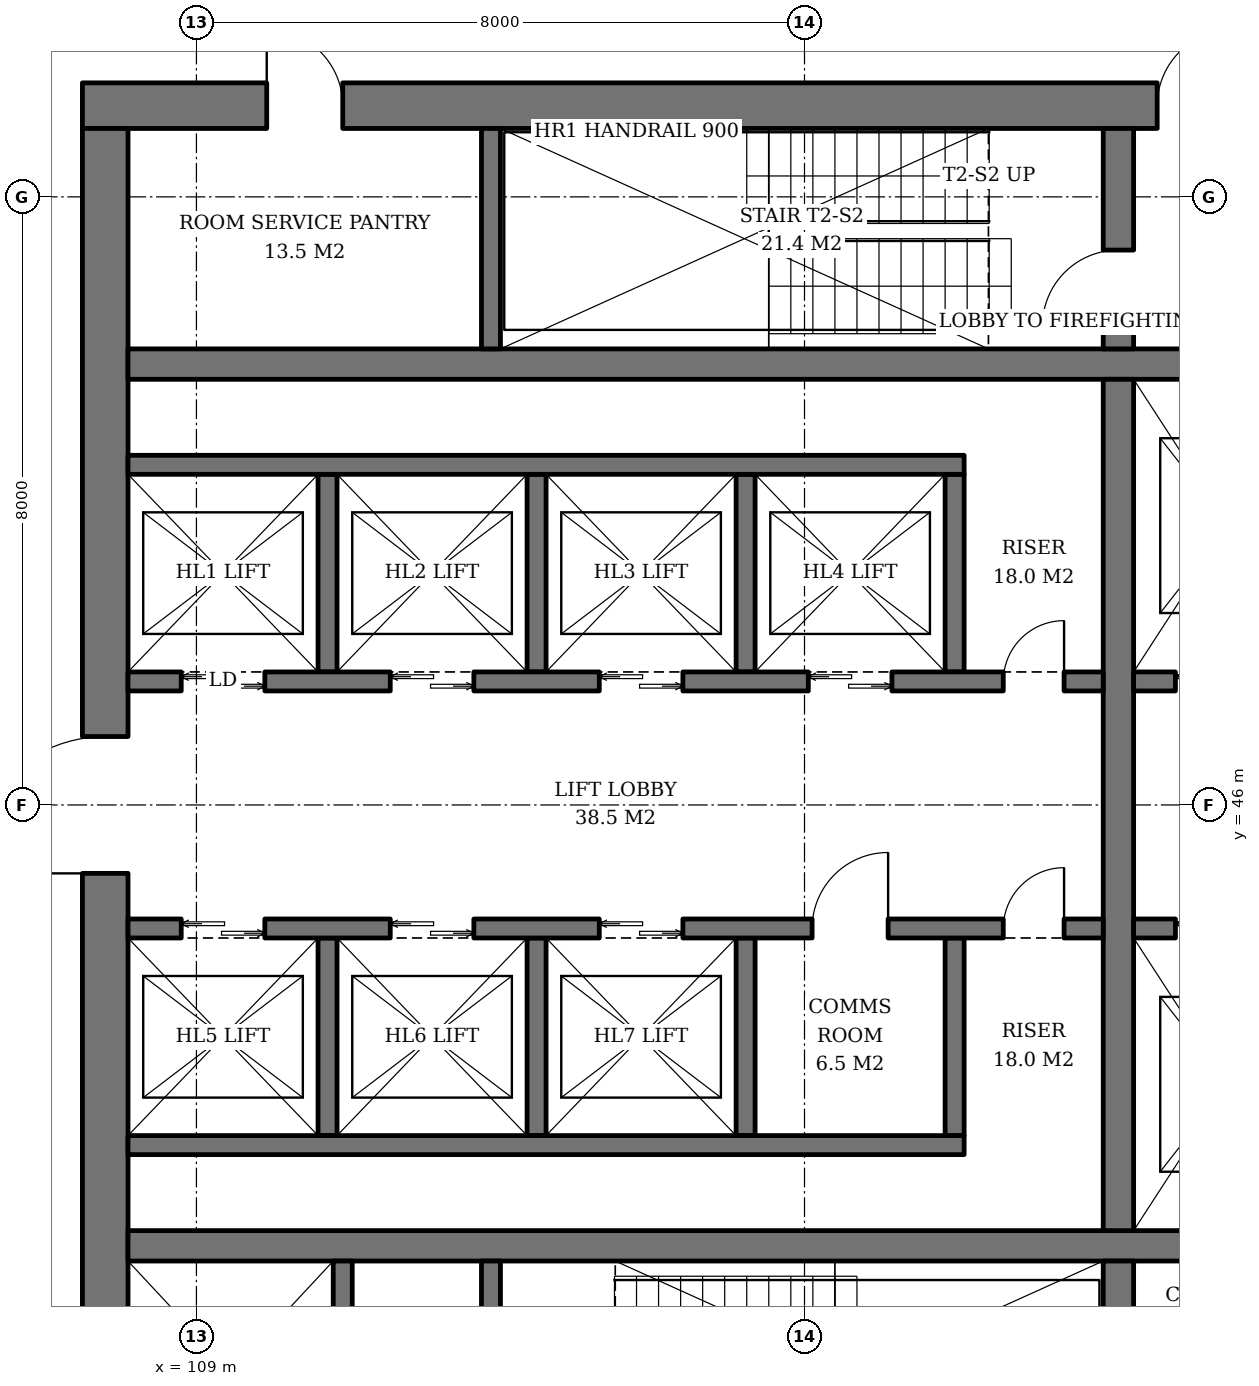
"""IFC4 building model, lengths in metres.
Left out: names, types, materials, properties, quantities, classifications, styles, units other than length and angle.
Written with IfcOpenShell. Run it as: python <this file> out.ifc"""

import sys

from ifc_helpers import new_model, si_unit, direction, frame, frame_2d, origin, place, context, subcontext, project, spatial, rectangle, extrude, element, fill, save


model = new_model("IFC4")
c1 = context("Model", 3, precision=1e-05, world=origin(), true_north=direction((0.0, 1.0)))
c2 = subcontext(c1, "Body", "Model", "MODEL_VIEW")
j1 = project(units=[si_unit("LENGTHUNIT", "METRE"), si_unit("PLANEANGLEUNIT", "RADIAN")], contexts=[c1])
p1 = place(None, origin())
s1 = spatial("IfcSite", under=j1, at=p1, CompositionType="ELEMENT")
p2 = place(p1, origin())
s2 = spatial("IfcBuilding", under=s1, at=p2, CompositionType="ELEMENT")
p3 = place(p2, frame((0.0, 0.0, 51.4)))
s3 = spatial("IfcBuildingStorey", under=s2, at=p3, CompositionType="ELEMENT", Elevation=51.4)
p4 = place(p3, frame((107.5, 55.2, 0.0), z_axis=(0.0, 0.0, 1.0), x_axis=(1.0, 0.0, 0.0)))
e1 = element("IfcWall", 1, at=p4, inside=s3, PredefinedType="SHEAR", context=c2, shape_type="SweptSolid", body=[
    extrude(rectangle(XDim=19.0, YDim=0.6, at=frame_2d((9.5, 0.0))), origin(), (0.0, 0.0, 1.0), 3.8),
])
p5 = place(p4, frame((14.14, 0.0, 0.0)))
e2 = element("IfcOpeningElement", 2, at=p5, cuts=e1, PredefinedType="OPENING", context=c2, shape_type="SweptSolid", body=[
    extrude(rectangle(XDim=1.0, YDim=2.1, at=frame_2d((0.5, 1.05))), frame((0.0, 0.31, 0.0), z_axis=(0.0, -1.0, 0.0), x_axis=(1.0, 0.0, 0.0)), (0.0, 0.0, 1.0), 0.62),
])
p6 = place(p4, frame((2.425, 0.0, 0.0)))
e3 = element("IfcOpeningElement", 3, at=p6, cuts=e1, PredefinedType="OPENING", context=c2, shape_type="SweptSolid", body=[
    extrude(rectangle(XDim=1.0, YDim=2.1, at=frame_2d((0.5, 1.05))), frame((0.0, 0.31, 0.0), z_axis=(0.0, -1.0, 0.0), x_axis=(1.0, 0.0, 0.0)), (0.0, 0.0, 1.0), 0.62),
])
p7 = place(p3, frame((107.8, 37.1, 0.0), z_axis=(0.0, 0.0, 1.0), x_axis=(0.0, 1.0, 0.0)))
e4 = element("IfcWall", 4, at=p7, inside=s3, PredefinedType="SHEAR", context=c2, shape_type="SweptSolid", body=[
    extrude(rectangle(XDim=17.8, YDim=0.6, at=frame_2d((8.9, 0.0))), origin(), (0.0, 0.0, 1.0), 3.8),
])
p8 = place(p7, frame((8.0, 0.0, 0.0)))
e5 = element("IfcOpeningElement", 5, at=p8, cuts=e4, PredefinedType="OPENING", context=c2, shape_type="SweptSolid", body=[
    extrude(rectangle(XDim=1.8, YDim=2.4, at=frame_2d((0.9, 1.2))), frame((0.0, 0.31, 0.0), z_axis=(0.0, -1.0, 0.0), x_axis=(1.0, 0.0, 0.0)), (0.0, 0.0, 1.0), 0.62),
])
for number, where, z_axis, x_axis in (
    (6, (108.1, 40.2, 0.0), (0.0, 0.0, 1.0), (1.0, 0.0, 0.0)),
    (7, (108.1, 51.8, 0.0), (0.0, 0.0, 1.0), (1.0, 0.0, 0.0)),
):
    element("IfcWall", number, at=place(p3, frame(where, z_axis=z_axis, x_axis=x_axis)), inside=s3, PredefinedType="SHEAR", context=c2, shape_type="SweptSolid", body=[
        extrude(rectangle(XDim=17.8, YDim=0.4, at=frame_2d((8.9, 0.0))), origin(), (0.0, 0.0, 1.0), 3.8),
    ])
p9 = place(p3, frame((121.13, 37.1, 0.0), z_axis=(0.0, 0.0, 1.0), x_axis=(0.0, 1.0, 0.0)))
e8 = element("IfcWall", 8, at=p9, inside=s3, PredefinedType="SHEAR", context=c2, shape_type="SweptSolid", body=[
    extrude(rectangle(XDim=2.9, YDim=0.4, at=frame_2d((1.45, 0.0))), origin(), (0.0, 0.0, 1.0), 3.8),
])
p10 = place(p3, frame((121.13, 40.4, 0.0), z_axis=(0.0, 0.0, 1.0), x_axis=(0.0, 1.0, 0.0)))
e9 = element("IfcWall", 9, at=p10, inside=s3, PredefinedType="SHEAR", context=c2, shape_type="SweptSolid", body=[
    extrude(rectangle(XDim=11.2, YDim=0.4, at=frame_2d((5.6, 0.0))), origin(), (0.0, 0.0, 1.0), 3.8),
])
p11 = place(p3, frame((121.13, 52.0, 0.0), z_axis=(0.0, 0.0, 1.0), x_axis=(0.0, 1.0, 0.0)))
e10 = element("IfcWall", 10, at=p11, inside=s3, PredefinedType="SHEAR", context=c2, shape_type="SweptSolid", body=[
    extrude(rectangle(XDim=2.9, YDim=0.4, at=frame_2d((1.45, 0.0))), origin(), (0.0, 0.0, 1.0), 3.8),
])
p12 = place(p11, frame((0.3, 0.0, 0.0)))
e11 = element("IfcOpeningElement", 11, at=p12, cuts=e10, PredefinedType="OPENING", context=c2, shape_type="SweptSolid", body=[
    extrude(rectangle(XDim=1.0, YDim=2.1, at=frame_2d((0.5, 1.05))), frame((0.0, 0.21, 0.0), z_axis=(0.0, -1.0, 0.0), x_axis=(1.0, 0.0, 0.0)), (0.0, 0.0, 1.0), 0.42),
])
p13 = place(p3, frame((110.925, 37.1, 0.0), z_axis=(0.0, 0.0, 1.0), x_axis=(0.0, 1.0, 0.0)))
e12 = element("IfcWall", 12, at=p13, inside=s3, PredefinedType="SHEAR", context=c2, shape_type="SweptSolid", body=[
    extrude(rectangle(XDim=2.9, YDim=0.25, at=frame_2d((1.45, 0.0))), origin(), (0.0, 0.0, 1.0), 3.8),
])
p14 = place(p13, frame((0.8, 0.0, 0.0)))
e13 = element("IfcOpeningElement", 13, at=p14, cuts=e12, PredefinedType="OPENING", context=c2, shape_type="SweptSolid", body=[
    extrude(rectangle(XDim=1.3, YDim=2.2, at=frame_2d((0.65, 1.1))), frame((0.0, 0.135, 0.0), z_axis=(0.0, -1.0, 0.0), x_axis=(1.0, 0.0, 0.0)), (0.0, 0.0, 1.0), 0.27),
])
p15 = place(p3, frame((112.875, 37.1, 0.0), z_axis=(0.0, 0.0, 1.0), x_axis=(0.0, 1.0, 0.0)))
e14 = element("IfcWall", 14, at=p15, inside=s3, PredefinedType="SHEAR", context=c2, shape_type="SweptSolid", body=[
    extrude(rectangle(XDim=2.9, YDim=0.25, at=frame_2d((1.45, 0.0))), origin(), (0.0, 0.0, 1.0), 3.8),
])
p16 = place(p15, frame((0.75, 0.0, 0.0)))
e15 = element("IfcOpeningElement", 15, at=p16, cuts=e14, PredefinedType="OPENING", context=c2, shape_type="SweptSolid", body=[
    extrude(rectangle(XDim=1.2, YDim=2.1, at=frame_2d((0.6, 1.05))), frame((0.0, 0.135, 0.0), z_axis=(0.0, -1.0, 0.0), x_axis=(1.0, 0.0, 0.0)), (0.0, 0.0, 1.0), 0.27),
])
p17 = place(p3, frame((112.875, 52.0, 0.0), z_axis=(0.0, 0.0, 1.0), x_axis=(0.0, 1.0, 0.0)))
e16 = element("IfcWall", 16, at=p17, inside=s3, PredefinedType="SHEAR", context=c2, shape_type="SweptSolid", body=[
    extrude(rectangle(XDim=2.9, YDim=0.25, at=frame_2d((1.45, 0.0))), origin(), (0.0, 0.0, 1.0), 3.8),
])
for number, where, z_axis, x_axis in (
    (17, (110.725, 47.75, 0.0), (0.0, 0.0, 1.0), (0.0, 1.0, 0.0)),
    (18, (113.475, 47.75, 0.0), (0.0, 0.0, 1.0), (0.0, 1.0, 0.0)),
    (19, (116.225, 47.75, 0.0), (0.0, 0.0, 1.0), (0.0, 1.0, 0.0)),
    (20, (118.975, 47.75, 0.0), (0.0, 0.0, 1.0), (0.0, 1.0, 0.0)),
):
    element("IfcWall", number, at=place(p3, frame(where, z_axis=z_axis, x_axis=x_axis)), inside=s3, PredefinedType="SHEAR", context=c2, shape_type="SweptSolid", body=[
        extrude(rectangle(XDim=2.6, YDim=0.25, at=frame_2d((1.3, 0.0))), origin(), (0.0, 0.0, 1.0), 3.8),
    ])
p18 = place(p3, frame((108.1, 50.475, 0.0), z_axis=(0.0, 0.0, 1.0), x_axis=(1.0, 0.0, 0.0)))
e21 = element("IfcWall", 21, at=p18, inside=s3, PredefinedType="SHEAR", context=c2, shape_type="SweptSolid", body=[
    extrude(rectangle(XDim=11.0, YDim=0.25, at=frame_2d((5.5, 0.0))), origin(), (0.0, 0.0, 1.0), 3.8),
])
p19 = place(p3, frame((108.1, 47.625, 0.0), z_axis=(0.0, 0.0, 1.0), x_axis=(1.0, 0.0, 0.0)))
e22 = element("IfcWall", 22, at=p19, inside=s3, PredefinedType="SHEAR", context=c2, shape_type="SweptSolid", body=[
    extrude(rectangle(XDim=12.83, YDim=0.25, at=frame_2d((6.415, 0.0))), origin(), (0.0, 0.0, 1.0), 3.8),
])
p20 = place(p19, frame((0.7, 0.0, 0.0)))
e23 = element("IfcOpeningElement", 23, at=p20, cuts=e22, PredefinedType="OPENING", context=c2, shape_type="SweptSolid", body=[
    extrude(rectangle(XDim=1.1, YDim=2.2, at=frame_2d((0.55, 1.1))), frame((0.0, 0.135, 0.0), z_axis=(0.0, -1.0, 0.0), x_axis=(1.0, 0.0, 0.0)), (0.0, 0.0, 1.0), 0.27),
])
p21 = place(p19, frame((3.45, 0.0, 0.0)))
e24 = element("IfcOpeningElement", 24, at=p21, cuts=e22, PredefinedType="OPENING", context=c2, shape_type="SweptSolid", body=[
    extrude(rectangle(XDim=1.1, YDim=2.2, at=frame_2d((0.55, 1.1))), frame((0.0, 0.135, 0.0), z_axis=(0.0, -1.0, 0.0), x_axis=(1.0, 0.0, 0.0)), (0.0, 0.0, 1.0), 0.27),
])
p22 = place(p19, frame((6.2, 0.0, 0.0)))
e25 = element("IfcOpeningElement", 25, at=p22, cuts=e22, PredefinedType="OPENING", context=c2, shape_type="SweptSolid", body=[
    extrude(rectangle(XDim=1.1, YDim=2.2, at=frame_2d((0.55, 1.1))), frame((0.0, 0.135, 0.0), z_axis=(0.0, -1.0, 0.0), x_axis=(1.0, 0.0, 0.0)), (0.0, 0.0, 1.0), 0.27),
])
p23 = place(p19, frame((8.95, 0.0, 0.0)))
e26 = element("IfcOpeningElement", 26, at=p23, cuts=e22, PredefinedType="OPENING", context=c2, shape_type="SweptSolid", body=[
    extrude(rectangle(XDim=1.1, YDim=2.2, at=frame_2d((0.55, 1.1))), frame((0.0, 0.135, 0.0), z_axis=(0.0, -1.0, 0.0), x_axis=(1.0, 0.0, 0.0)), (0.0, 0.0, 1.0), 0.27),
])
p24 = place(p19, frame((11.515, 0.0, 0.0)))
e27 = element("IfcOpeningElement", 27, at=p24, cuts=e22, PredefinedType="OPENING", context=c2, shape_type="SweptSolid", body=[
    extrude(rectangle(XDim=0.8, YDim=2.0, at=frame_2d((0.4, 1.0))), frame((0.0, 0.135, 0.0), z_axis=(0.0, -1.0, 0.0), x_axis=(1.0, 0.0, 0.0)), (0.0, 0.0, 1.0), 0.27),
])
for number, where, z_axis, x_axis in (
    (28, (110.725, 44.25, 0.0), (0.0, 0.0, 1.0), (0.0, -1.0, 0.0)),
    (29, (113.475, 44.25, 0.0), (0.0, 0.0, 1.0), (0.0, -1.0, 0.0)),
    (30, (116.225, 44.25, 0.0), (0.0, 0.0, 1.0), (0.0, -1.0, 0.0)),
    (31, (118.975, 44.25, 0.0), (0.0, 0.0, 1.0), (0.0, -1.0, 0.0)),
):
    element("IfcWall", number, at=place(p3, frame(where, z_axis=z_axis, x_axis=x_axis)), inside=s3, PredefinedType="SHEAR", context=c2, shape_type="SweptSolid", body=[
        extrude(rectangle(XDim=2.6, YDim=0.25, at=frame_2d((1.3, 0.0))), origin(), (0.0, 0.0, 1.0), 3.8),
    ])
p25 = place(p3, frame((108.1, 41.525, 0.0), z_axis=(0.0, 0.0, 1.0), x_axis=(1.0, 0.0, 0.0)))
e32 = element("IfcWall", 32, at=p25, inside=s3, PredefinedType="SHEAR", context=c2, shape_type="SweptSolid", body=[
    extrude(rectangle(XDim=11.0, YDim=0.25, at=frame_2d((5.5, 0.0))), origin(), (0.0, 0.0, 1.0), 3.8),
])
p26 = place(p3, frame((108.1, 44.375, 0.0), z_axis=(0.0, 0.0, 1.0), x_axis=(1.0, 0.0, 0.0)))
e33 = element("IfcWall", 33, at=p26, inside=s3, PredefinedType="SHEAR", context=c2, shape_type="SweptSolid", body=[
    extrude(rectangle(XDim=12.83, YDim=0.25, at=frame_2d((6.415, 0.0))), origin(), (0.0, 0.0, 1.0), 3.8),
])
p27 = place(p26, frame((0.7, 0.0, 0.0)))
e34 = element("IfcOpeningElement", 34, at=p27, cuts=e33, PredefinedType="OPENING", context=c2, shape_type="SweptSolid", body=[
    extrude(rectangle(XDim=1.1, YDim=2.2, at=frame_2d((0.55, 1.1))), frame((0.0, 0.135, 0.0), z_axis=(0.0, -1.0, 0.0), x_axis=(1.0, 0.0, 0.0)), (0.0, 0.0, 1.0), 0.27),
])
p28 = place(p26, frame((3.45, 0.0, 0.0)))
e35 = element("IfcOpeningElement", 35, at=p28, cuts=e33, PredefinedType="OPENING", context=c2, shape_type="SweptSolid", body=[
    extrude(rectangle(XDim=1.1, YDim=2.2, at=frame_2d((0.55, 1.1))), frame((0.0, 0.135, 0.0), z_axis=(0.0, -1.0, 0.0), x_axis=(1.0, 0.0, 0.0)), (0.0, 0.0, 1.0), 0.27),
])
p29 = place(p26, frame((6.2, 0.0, 0.0)))
e36 = element("IfcOpeningElement", 36, at=p29, cuts=e33, PredefinedType="OPENING", context=c2, shape_type="SweptSolid", body=[
    extrude(rectangle(XDim=1.1, YDim=2.2, at=frame_2d((0.55, 1.1))), frame((0.0, 0.135, 0.0), z_axis=(0.0, -1.0, 0.0), x_axis=(1.0, 0.0, 0.0)), (0.0, 0.0, 1.0), 0.27),
])
p30 = place(p26, frame((9.0, 0.0, 0.0)))
e37 = element("IfcOpeningElement", 37, at=p30, cuts=e33, PredefinedType="OPENING", context=c2, shape_type="SweptSolid", body=[
    extrude(rectangle(XDim=1.0, YDim=2.1, at=frame_2d((0.5, 1.05))), frame((0.0, 0.135, 0.0), z_axis=(0.0, -1.0, 0.0), x_axis=(1.0, 0.0, 0.0)), (0.0, 0.0, 1.0), 0.27),
])
p31 = place(p26, frame((11.515, 0.0, 0.0)))
e38 = element("IfcOpeningElement", 38, at=p31, cuts=e33, PredefinedType="OPENING", context=c2, shape_type="SweptSolid", body=[
    extrude(rectangle(XDim=0.8, YDim=2.0, at=frame_2d((0.4, 1.0))), frame((0.0, 0.135, 0.0), z_axis=(0.0, -1.0, 0.0), x_axis=(1.0, 0.0, 0.0)), (0.0, 0.0, 1.0), 0.27),
])
p32 = place(p3, frame((121.33, 47.625, 0.0), z_axis=(0.0, 0.0, 1.0), x_axis=(1.0, 0.0, 0.0)))
e39 = element("IfcWall", 39, at=p32, inside=s3, PredefinedType="SHEAR", context=c2, shape_type="SweptSolid", body=[
    extrude(rectangle(XDim=4.57, YDim=0.25, at=frame_2d((2.285, 0.0))), origin(), (0.0, 0.0, 1.0), 3.8),
])
p33 = place(p32, frame((0.55, 0.0, 0.0)))
e40 = element("IfcOpeningElement", 40, at=p33, cuts=e39, PredefinedType="OPENING", context=c2, shape_type="SweptSolid", body=[
    extrude(rectangle(XDim=1.4, YDim=2.4, at=frame_2d((0.7, 1.2))), frame((0.0, 0.135, 0.0), z_axis=(0.0, -1.0, 0.0), x_axis=(1.0, 0.0, 0.0)), (0.0, 0.0, 1.0), 0.27),
])
p34 = place(p32, frame((3.26, 0.0, 0.0)))
e41 = element("IfcOpeningElement", 41, at=p34, cuts=e39, PredefinedType="OPENING", context=c2, shape_type="SweptSolid", body=[
    extrude(rectangle(XDim=0.8, YDim=2.0, at=frame_2d((0.4, 1.0))), frame((0.0, 0.135, 0.0), z_axis=(0.0, -1.0, 0.0), x_axis=(1.0, 0.0, 0.0)), (0.0, 0.0, 1.0), 0.27),
])
p35 = place(p3, frame((121.33, 44.375, 0.0), z_axis=(0.0, 0.0, 1.0), x_axis=(1.0, 0.0, 0.0)))
e42 = element("IfcWall", 42, at=p35, inside=s3, PredefinedType="SHEAR", context=c2, shape_type="SweptSolid", body=[
    extrude(rectangle(XDim=4.57, YDim=0.25, at=frame_2d((2.285, 0.0))), origin(), (0.0, 0.0, 1.0), 3.8),
])
p36 = place(p35, frame((0.55, 0.0, 0.0)))
e43 = element("IfcOpeningElement", 43, at=p36, cuts=e42, PredefinedType="OPENING", context=c2, shape_type="SweptSolid", body=[
    extrude(rectangle(XDim=1.4, YDim=2.4, at=frame_2d((0.7, 1.2))), frame((0.0, 0.135, 0.0), z_axis=(0.0, -1.0, 0.0), x_axis=(1.0, 0.0, 0.0)), (0.0, 0.0, 1.0), 0.27),
])
p37 = place(p35, frame((3.26, 0.0, 0.0)))
e44 = element("IfcOpeningElement", 44, at=p37, cuts=e42, PredefinedType="OPENING", context=c2, shape_type="SweptSolid", body=[
    extrude(rectangle(XDim=0.8, YDim=2.0, at=frame_2d((0.4, 1.0))), frame((0.0, 0.135, 0.0), z_axis=(0.0, -1.0, 0.0), x_axis=(1.0, 0.0, 0.0)), (0.0, 0.0, 1.0), 0.27),
])
p38 = place(p20, origin())
e45 = element("IfcDoor", 45, at=p38, inside=s3, OperationType="DOUBLE_DOOR_SLIDING", PredefinedType="DOOR", context=c2, shape_type="SweptSolid", body=[
    extrude(rectangle(XDim=1.1, YDim=2.2, at=frame_2d((0.55, 1.1))), frame((0.0, 0.025, 0.0), z_axis=(0.0, -1.0, 0.0), x_axis=(1.0, 0.0, 0.0)), (0.0, 0.0, 1.0), 0.05),
])
fill(e23, e45)
p39 = place(p21, origin())
e46 = element("IfcDoor", 46, at=p39, inside=s3, OperationType="DOUBLE_DOOR_SLIDING", PredefinedType="DOOR", context=c2, shape_type="SweptSolid", body=[
    extrude(rectangle(XDim=1.1, YDim=2.2, at=frame_2d((0.55, 1.1))), frame((0.0, 0.025, 0.0), z_axis=(0.0, -1.0, 0.0), x_axis=(1.0, 0.0, 0.0)), (0.0, 0.0, 1.0), 0.05),
])
fill(e24, e46)
p40 = place(p22, origin())
e47 = element("IfcDoor", 47, at=p40, inside=s3, OperationType="DOUBLE_DOOR_SLIDING", PredefinedType="DOOR", context=c2, shape_type="SweptSolid", body=[
    extrude(rectangle(XDim=1.1, YDim=2.2, at=frame_2d((0.55, 1.1))), frame((0.0, 0.025, 0.0), z_axis=(0.0, -1.0, 0.0), x_axis=(1.0, 0.0, 0.0)), (0.0, 0.0, 1.0), 0.05),
])
fill(e25, e47)
p41 = place(p23, origin())
e48 = element("IfcDoor", 48, at=p41, inside=s3, OperationType="DOUBLE_DOOR_SLIDING", PredefinedType="DOOR", context=c2, shape_type="SweptSolid", body=[
    extrude(rectangle(XDim=1.1, YDim=2.2, at=frame_2d((0.55, 1.1))), frame((0.0, 0.025, 0.0), z_axis=(0.0, -1.0, 0.0), x_axis=(1.0, 0.0, 0.0)), (0.0, 0.0, 1.0), 0.05),
])
fill(e26, e48)
p42 = place(p24, origin())
e49 = element("IfcDoor", 49, at=p42, inside=s3, OperationType="SINGLE_SWING_RIGHT", PredefinedType="DOOR", context=c2, shape_type="SweptSolid", body=[
    extrude(rectangle(XDim=0.8, YDim=2.0, at=frame_2d((0.4, 1.0))), frame((0.0, 0.025, 0.0), z_axis=(0.0, -1.0, 0.0), x_axis=(1.0, 0.0, 0.0)), (0.0, 0.0, 1.0), 0.05),
])
fill(e27, e49)
p43 = place(p27, origin())
e50 = element("IfcDoor", 50, at=p43, inside=s3, OperationType="DOUBLE_DOOR_SLIDING", PredefinedType="DOOR", context=c2, shape_type="SweptSolid", body=[
    extrude(rectangle(XDim=1.1, YDim=2.2, at=frame_2d((0.55, 1.1))), frame((0.0, 0.025, 0.0), z_axis=(0.0, -1.0, 0.0), x_axis=(1.0, 0.0, 0.0)), (0.0, 0.0, 1.0), 0.05),
])
fill(e34, e50)
p44 = place(p28, origin())
e51 = element("IfcDoor", 51, at=p44, inside=s3, OperationType="DOUBLE_DOOR_SLIDING", PredefinedType="DOOR", context=c2, shape_type="SweptSolid", body=[
    extrude(rectangle(XDim=1.1, YDim=2.2, at=frame_2d((0.55, 1.1))), frame((0.0, 0.025, 0.0), z_axis=(0.0, -1.0, 0.0), x_axis=(1.0, 0.0, 0.0)), (0.0, 0.0, 1.0), 0.05),
])
fill(e35, e51)
p45 = place(p29, origin())
e52 = element("IfcDoor", 52, at=p45, inside=s3, OperationType="DOUBLE_DOOR_SLIDING", PredefinedType="DOOR", context=c2, shape_type="SweptSolid", body=[
    extrude(rectangle(XDim=1.1, YDim=2.2, at=frame_2d((0.55, 1.1))), frame((0.0, 0.025, 0.0), z_axis=(0.0, -1.0, 0.0), x_axis=(1.0, 0.0, 0.0)), (0.0, 0.0, 1.0), 0.05),
])
fill(e36, e52)
p46 = place(p30, origin())
e53 = element("IfcDoor", 53, at=p46, inside=s3, OperationType="SINGLE_SWING_RIGHT", PredefinedType="DOOR", context=c2, shape_type="SweptSolid", body=[
    extrude(rectangle(XDim=1.0, YDim=2.1, at=frame_2d((0.5, 1.05))), frame((0.0, 0.025, 0.0), z_axis=(0.0, -1.0, 0.0), x_axis=(1.0, 0.0, 0.0)), (0.0, 0.0, 1.0), 0.05),
])
fill(e37, e53)
p47 = place(p31, origin())
e54 = element("IfcDoor", 54, at=p47, inside=s3, OperationType="SINGLE_SWING_RIGHT", PredefinedType="DOOR", context=c2, shape_type="SweptSolid", body=[
    extrude(rectangle(XDim=0.8, YDim=2.0, at=frame_2d((0.4, 1.0))), frame((0.0, 0.025, 0.0), z_axis=(0.0, -1.0, 0.0), x_axis=(1.0, 0.0, 0.0)), (0.0, 0.0, 1.0), 0.05),
])
fill(e38, e54)
p48 = place(p33, origin())
e55 = element("IfcDoor", 55, at=p48, inside=s3, OperationType="DOUBLE_DOOR_SLIDING", PredefinedType="DOOR", context=c2, shape_type="SweptSolid", body=[
    extrude(rectangle(XDim=1.4, YDim=2.4, at=frame_2d((0.7, 1.2))), frame((0.0, 0.025, 0.0), z_axis=(0.0, -1.0, 0.0), x_axis=(1.0, 0.0, 0.0)), (0.0, 0.0, 1.0), 0.05),
])
fill(e40, e55)
p49 = place(p36, origin())
e56 = element("IfcDoor", 56, at=p49, inside=s3, OperationType="DOUBLE_DOOR_SLIDING", PredefinedType="DOOR", context=c2, shape_type="SweptSolid", body=[
    extrude(rectangle(XDim=1.4, YDim=2.4, at=frame_2d((0.7, 1.2))), frame((0.0, 0.025, 0.0), z_axis=(0.0, -1.0, 0.0), x_axis=(1.0, 0.0, 0.0)), (0.0, 0.0, 1.0), 0.05),
])
fill(e43, e56)
p50 = place(p12, origin())
e57 = element("IfcDoor", 57, at=p50, inside=s3, OperationType="SINGLE_SWING_LEFT", PredefinedType="DOOR", context=c2, shape_type="SweptSolid", body=[
    extrude(rectangle(XDim=1.0, YDim=2.1, at=frame_2d((0.5, 1.05))), frame((0.0, 0.025, 0.0), z_axis=(0.0, -1.0, 0.0), x_axis=(1.0, 0.0, 0.0)), (0.0, 0.0, 1.0), 0.05),
])
fill(e11, e57)
p51 = place(p5, origin())
e58 = element("IfcDoor", 58, at=p51, inside=s3, OperationType="SINGLE_SWING_RIGHT", PredefinedType="DOOR", context=c2, shape_type="SweptSolid", body=[
    extrude(rectangle(XDim=1.0, YDim=2.1, at=frame_2d((0.5, 1.05))), frame((0.0, 0.025, 0.0), z_axis=(0.0, -1.0, 0.0), x_axis=(1.0, 0.0, 0.0)), (0.0, 0.0, 1.0), 0.05),
])
fill(e2, e58)
p52 = place(p8, origin())
e59 = element("IfcDoor", 59, at=p52, inside=s3, OperationType="DOUBLE_DOOR_SINGLE_SWING", PredefinedType="DOOR", context=c2, shape_type="SweptSolid", body=[
    extrude(rectangle(XDim=1.8, YDim=2.4, at=frame_2d((0.9, 1.2))), frame((0.0, 0.025, 0.0), z_axis=(0.0, -1.0, 0.0), x_axis=(1.0, 0.0, 0.0)), (0.0, 0.0, 1.0), 0.05),
])
fill(e5, e59)
p53 = place(p6, origin())
e60 = element("IfcDoor", 60, at=p53, inside=s3, OperationType="SINGLE_SWING_LEFT", PredefinedType="DOOR", context=c2, shape_type="SweptSolid", body=[
    extrude(rectangle(XDim=1.0, YDim=2.1, at=frame_2d((0.5, 1.05))), frame((0.0, -0.24, 0.0), z_axis=(0.0, -1.0, 0.0), x_axis=(1.0, 0.0, 0.0)), (0.0, 0.0, 1.0), 0.05),
])
fill(e3, e60)
save(model, sys.argv[1])
